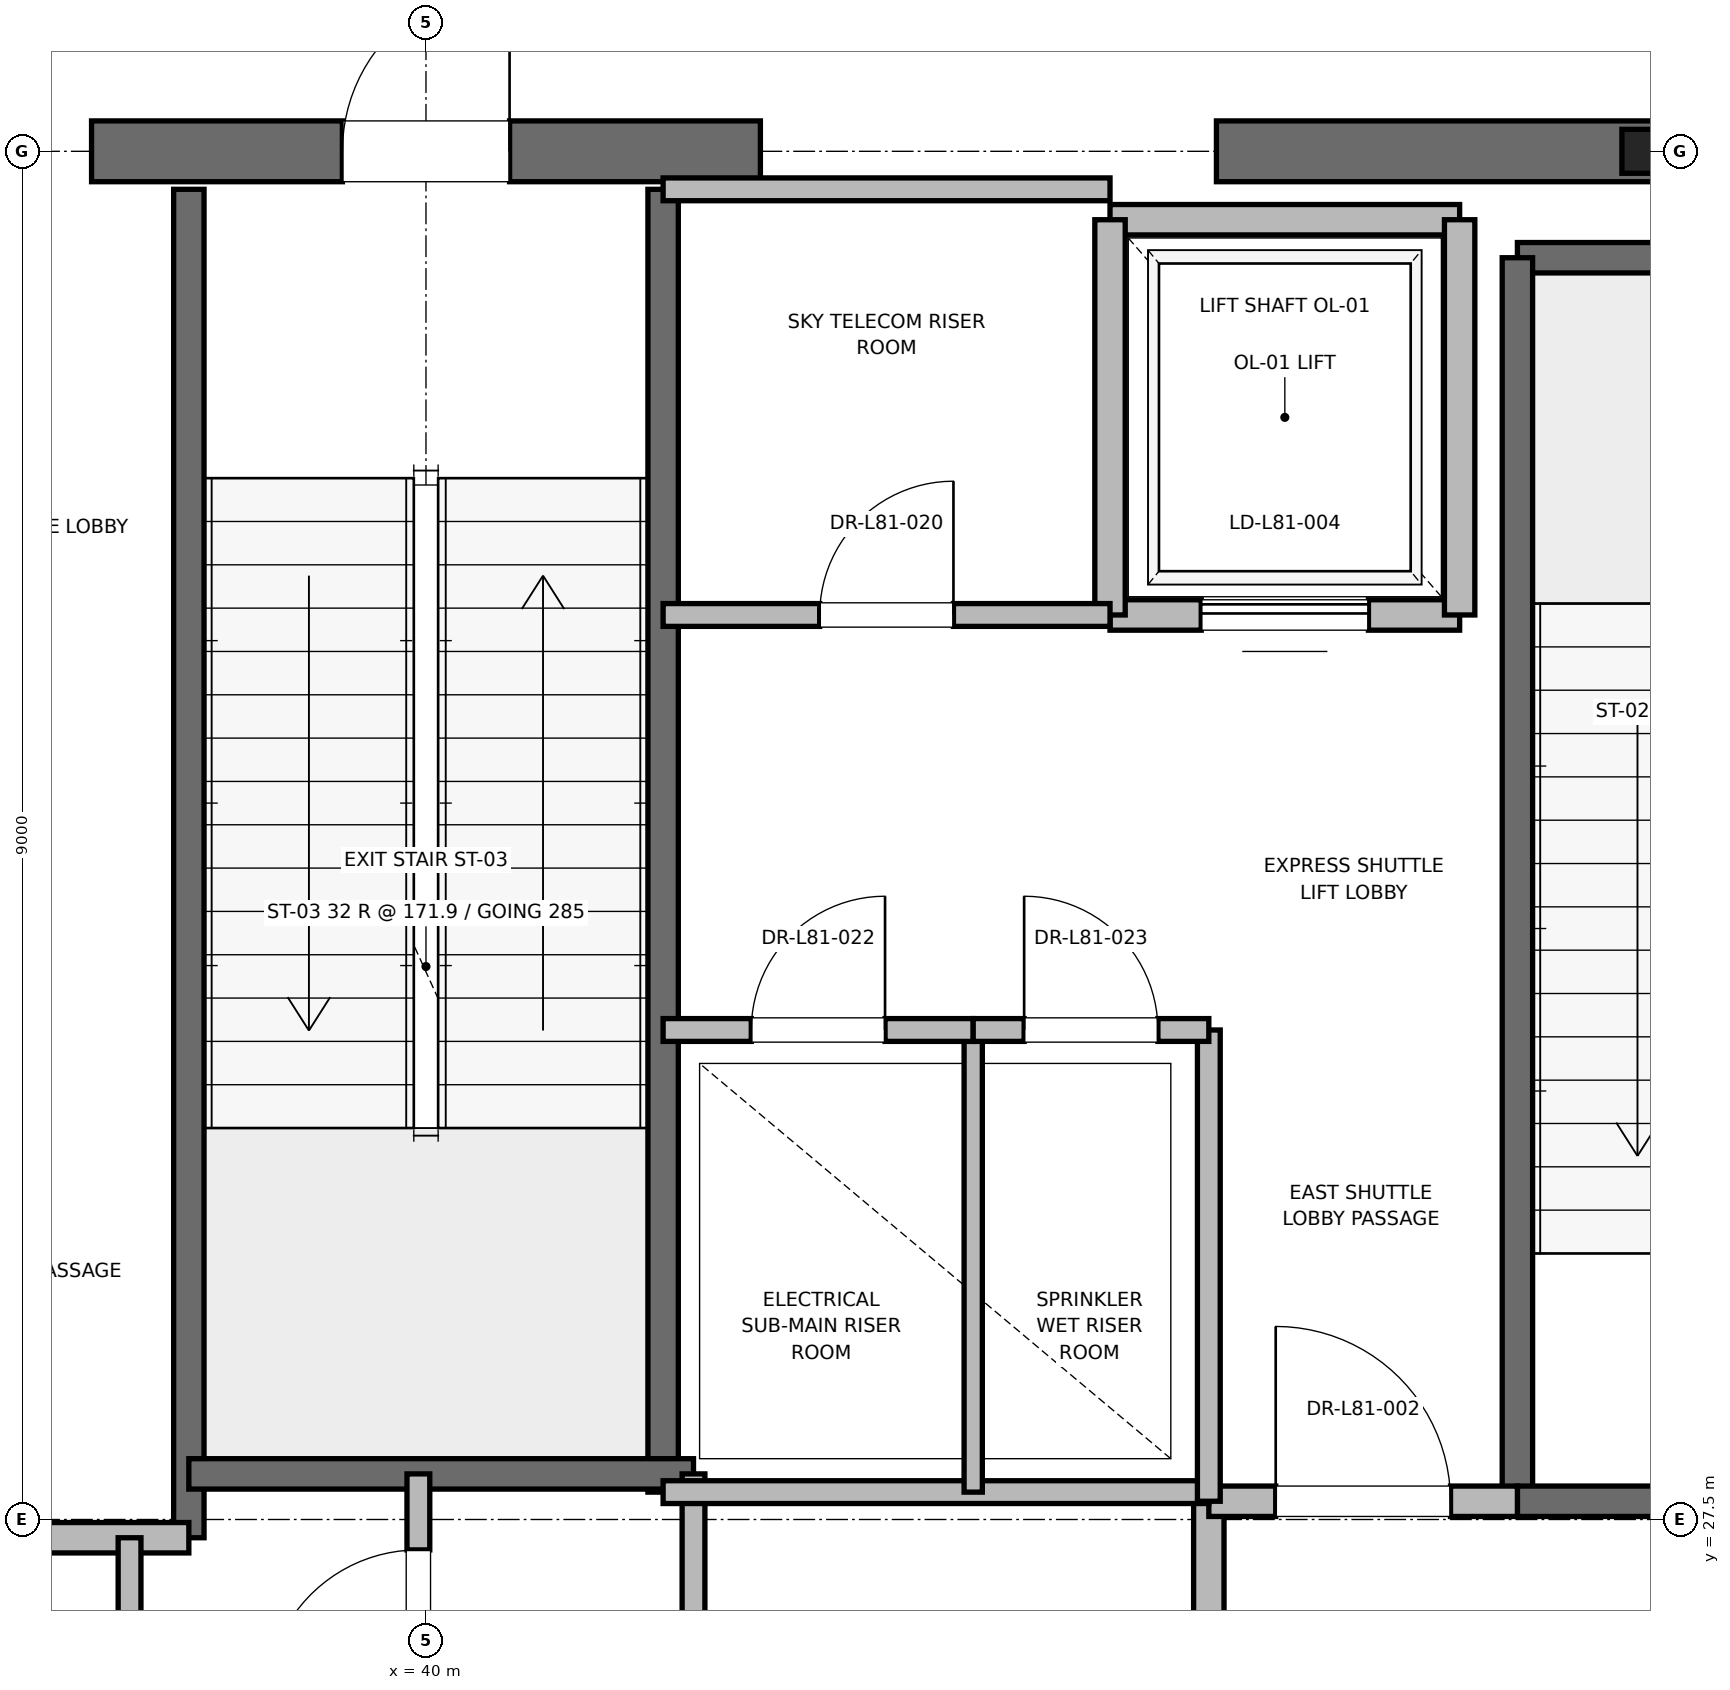
"""IFC4 building model, lengths in metres.
Left out: names, types, materials, properties, quantities, classifications, styles, units other than length and angle.
Written with IfcOpenShell. Run it as: python <this file> out.ifc"""

import sys

from ifc_helpers import new_model, si_unit, direction, frame, frame_2d, origin, origin_2d, place, context, subcontext, project, spatial, rectangle, i_section, extrude, element, fill, save


model = new_model("IFC4")
c1 = context("Model", 3, precision=1e-05, world=origin(), true_north=direction((0.0, 1.0)))
c2 = subcontext(c1, "Body", "Model", "MODEL_VIEW")
j1 = project(units=[si_unit("LENGTHUNIT", "METRE"), si_unit("PLANEANGLEUNIT", "RADIAN")], contexts=[c1])
p1 = place(None, origin())
s1 = spatial("IfcSite", under=j1, at=p1, CompositionType="ELEMENT")
p2 = place(p1, origin())
s2 = spatial("IfcBuilding", under=s1, at=p2, CompositionType="ELEMENT")
p3 = place(p2, frame((0.0, 0.0, 348.8)))
s3 = spatial("IfcBuildingStorey", under=s2, at=p3, CompositionType="ELEMENT", Elevation=348.8)
p4 = place(p3, frame((48.0, 36.5, 0.0), z_axis=(0.0, 0.0, 1.0), x_axis=(1.0, 0.0, 0.0)))
e1 = element("IfcColumn", 1, at=p4, inside=s3, PredefinedType="COLUMN", context=c2, shape_type="SweptSolid", body=[
    extrude(i_section(OverallWidth=0.265, OverallDepth=0.289, WebThickness=0.019, FlangeThickness=0.032, FilletRadius=0.013, at=origin_2d()), origin(), (0.0, 0.0, 1.0), 5.5),
])
p5 = place(p3, frame((37.8, 36.5, 0.0), z_axis=(0.0, 0.0, 1.0), x_axis=(1.0, 0.0, 0.0)))
e2 = element("IfcWall", 2, at=p5, inside=s3, PredefinedType="SHEAR", context=c2, shape_type="SweptSolid", body=[
    extrude(rectangle(XDim=4.4, YDim=0.4, at=frame_2d((2.2, 0.0))), origin(), (0.0, 0.0, 1.0), 5.2),
])
p6 = place(p5, frame((1.65, 0.0, 0.0)))
e3 = element("IfcOpeningElement", 3, at=p6, cuts=e2, PredefinedType="OPENING", context=c2, shape_type="SweptSolid", body=[
    extrude(rectangle(XDim=1.1, YDim=2.15, at=frame_2d((0.55, 1.075))), frame((0.0, 0.2, 0.0), z_axis=(0.0, -1.0, 0.0), x_axis=(1.0, 0.0, 0.0)), (0.0, 0.0, 1.0), 0.4),
])
p7 = place(p3, frame((45.2, 36.5, 0.0), z_axis=(0.0, 0.0, 1.0), x_axis=(1.0, 0.0, 0.0)))
e4 = element("IfcWall", 4, at=p7, inside=s3, PredefinedType="SHEAR", context=c2, shape_type="SweptSolid", body=[
    extrude(rectangle(XDim=5.8, YDim=0.4, at=frame_2d((2.9, 0.0))), origin(), (0.0, 0.0, 1.0), 5.2),
])
p8 = place(p3, frame((47.18, 35.8, 0.0), z_axis=(0.0, 0.0, 1.0), x_axis=(1.0, 0.0, 0.0)))
e5 = element("IfcWall", 5, at=p8, inside=s3, PredefinedType="SOLIDWALL", context=c2, shape_type="SweptSolid", body=[
    extrude(rectangle(XDim=3.12, YDim=0.2, at=frame_2d((1.56, 0.0))), origin(), (0.0, 0.0, 1.0), 5.2),
])
p9 = place(p3, frame((47.18, 27.62, 0.0), z_axis=(0.0, 0.0, 1.0), x_axis=(0.0, 1.0, 0.0)))
e6 = element("IfcWall", 6, at=p9, inside=s3, PredefinedType="SOLIDWALL", context=c2, shape_type="SweptSolid", body=[
    extrude(rectangle(XDim=8.18, YDim=0.2, at=frame_2d((4.09, 0.0))), origin(), (0.0, 0.0, 1.0), 5.2),
])
p10 = place(p3, frame((47.18, 27.62, 0.0), z_axis=(0.0, 0.0, 1.0), x_axis=(1.0, 0.0, 0.0)))
e7 = element("IfcWall", 7, at=p10, inside=s3, PredefinedType="SOLIDWALL", context=c2, shape_type="SweptSolid", body=[
    extrude(rectangle(XDim=3.12, YDim=0.2, at=frame_2d((1.56, 0.0))), origin(), (0.0, 0.0, 1.0), 5.2),
])
p11 = place(p10, frame((1.01, 0.0, 0.0)))
e8 = element("IfcOpeningElement", 8, at=p11, cuts=e7, PredefinedType="OPENING", context=c2, shape_type="SweptSolid", body=[
    extrude(rectangle(XDim=1.1, YDim=2.15, at=frame_2d((0.55, 1.075))), frame((0.0, 0.1, 0.0), z_axis=(0.0, -1.0, 0.0), x_axis=(1.0, 0.0, 0.0)), (0.0, 0.0, 1.0), 0.2),
])
p12 = place(p3, frame((38.44, 27.38, 0.0), z_axis=(0.0, 0.0, 1.0), x_axis=(0.0, 1.0, 0.0)))
e9 = element("IfcWall", 9, at=p12, inside=s3, PredefinedType="SOLIDWALL", context=c2, shape_type="SweptSolid", body=[
    extrude(rectangle(XDim=8.87, YDim=0.2, at=frame_2d((4.435, 0.0))), origin(), (0.0, 0.0, 1.0), 5.2),
])
p13 = place(p3, frame((41.56, 27.68, 0.0), z_axis=(0.0, 0.0, 1.0), x_axis=(0.0, 1.0, 0.0)))
e10 = element("IfcWall", 10, at=p13, inside=s3, PredefinedType="SOLIDWALL", context=c2, shape_type="SweptSolid", body=[
    extrude(rectangle(XDim=8.57, YDim=0.2, at=frame_2d((4.285, 0.0))), origin(), (0.0, 0.0, 1.0), 5.2),
])
p14 = place(p3, frame((38.44, 27.8, 0.0), z_axis=(0.0, 0.0, 1.0), x_axis=(1.0, 0.0, 0.0)))
e11 = element("IfcWall", 11, at=p14, inside=s3, PredefinedType="SOLIDWALL", context=c2, shape_type="SweptSolid", body=[
    extrude(rectangle(XDim=3.32, YDim=0.2, at=frame_2d((1.66, 0.0))), origin(), (0.0, 0.0, 1.0), 5.2),
])
p15 = place(p3, frame((32.82, 27.38, 0.0), z_axis=(0.0, 0.0, 1.0), x_axis=(1.0, 0.0, 0.0)))
e12 = element("IfcWall", 12, at=p15, inside=s3, PredefinedType="PARTITIONING", context=c2, shape_type="SweptSolid", body=[
    extrude(rectangle(XDim=5.62, YDim=0.2, at=frame_2d((2.81, 0.0))), origin(), (0.0, 0.0, 1.0), 5.2),
])
p16 = place(p3, frame((45.15, 24.25, 0.0), z_axis=(0.0, 0.0, 1.0), x_axis=(0.0, 1.0, 0.0)))
e13 = element("IfcWall", 13, at=p16, inside=s3, PredefinedType="PARTITIONING", context=c2, shape_type="SweptSolid", body=[
    extrude(rectangle(XDim=3.37, YDim=0.2, at=frame_2d((1.685, 0.0))), origin(), (0.0, 0.0, 1.0), 5.2),
])
p17 = place(p3, frame((45.15, 27.62, 0.0), z_axis=(0.0, 0.0, 1.0), x_axis=(1.0, 0.0, 0.0)))
e14 = element("IfcWall", 14, at=p17, inside=s3, PredefinedType="PARTITIONING", context=c2, shape_type="SweptSolid", body=[
    extrude(rectangle(XDim=2.03, YDim=0.2, at=frame_2d((1.015, 0.0))), origin(), (0.0, 0.0, 1.0), 5.2),
])
p18 = place(p17, frame((0.44, 0.0, 0.0)))
e15 = element("IfcOpeningElement", 15, at=p18, cuts=e14, PredefinedType="OPENING", context=c2, shape_type="SweptSolid", body=[
    extrude(rectangle(XDim=1.15, YDim=2.2, at=frame_2d((0.575, 1.1))), frame((0.0, 0.1, 0.0), z_axis=(0.0, -1.0, 0.0), x_axis=(1.0, 0.0, 0.0)), (0.0, 0.0, 1.0), 0.2),
])
p19 = place(p3, frame((44.5, 33.45, 0.0), z_axis=(0.0, 0.0, 1.0), x_axis=(1.0, 0.0, 0.0)))
e16 = element("IfcWall", 16, at=p19, inside=s3, PredefinedType="SOLIDWALL", context=c2, shape_type="SweptSolid", body=[
    extrude(rectangle(XDim=2.3, YDim=0.2, at=frame_2d((1.15, 0.0))), origin(), (0.0, 0.0, 1.0), 5.2),
])
p20 = place(p19, frame((0.6, 0.0, 0.0)))
e17 = element("IfcOpeningElement", 17, at=p20, cuts=e16, PredefinedType="OPENING", context=c2, shape_type="SweptSolid", body=[
    extrude(rectangle(XDim=1.1, YDim=2.2, at=frame_2d((0.55, 1.1))), frame((0.0, 0.1, 0.0), z_axis=(0.0, -1.0, 0.0), x_axis=(1.0, 0.0, 0.0)), (0.0, 0.0, 1.0), 0.2),
])
p21 = place(p3, frame((46.8, 36.05, 0.0), z_axis=(0.0, 0.0, 1.0), x_axis=(-1.0, 0.0, 0.0)))
e18 = element("IfcWall", 18, at=p21, inside=s3, PredefinedType="SOLIDWALL", context=c2, shape_type="SweptSolid", body=[
    extrude(rectangle(XDim=2.3, YDim=0.2, at=frame_2d((1.15, 0.0))), origin(), (0.0, 0.0, 1.0), 4.28),
])
p22 = place(p3, frame((44.5, 36.05, 0.0), z_axis=(0.0, 0.0, 1.0), x_axis=(0.0, -1.0, 0.0)))
e19 = element("IfcWall", 19, at=p22, inside=s3, PredefinedType="SOLIDWALL", context=c2, shape_type="SweptSolid", body=[
    extrude(rectangle(XDim=2.6, YDim=0.2, at=frame_2d((1.3, 0.0))), origin(), (0.0, 0.0, 1.0), 4.28),
])
p23 = place(p3, frame((46.8, 33.45, 0.0), z_axis=(0.0, 0.0, 1.0), x_axis=(0.0, 1.0, 0.0)))
e20 = element("IfcWall", 20, at=p23, inside=s3, PredefinedType="SOLIDWALL", context=c2, shape_type="SweptSolid", body=[
    extrude(rectangle(XDim=2.6, YDim=0.2, at=frame_2d((1.3, 0.0))), origin(), (0.0, 0.0, 1.0), 5.2),
])
p24 = place(p3, frame((41.76, 23.8, 0.0), z_axis=(0.0, 0.0, 1.0), x_axis=(0.0, 1.0, 0.0)))
e21 = element("IfcWall", 21, at=p24, inside=s3, PredefinedType="PARTITIONING", context=c2, shape_type="SweptSolid", body=[
    extrude(rectangle(XDim=4.0, YDim=0.15, at=frame_2d((2.0, 0.0))), origin(), (0.0, 0.0, 1.0), 2.85),
])
p25 = place(p3, frame((39.95, 25.8, 0.0), z_axis=(0.0, 0.0, 1.0), x_axis=(0.0, 1.0, 0.0)))
e22 = element("IfcWall", 22, at=p25, inside=s3, PredefinedType="PARTITIONING", context=c2, shape_type="SweptSolid", body=[
    extrude(rectangle(XDim=2.0, YDim=0.15, at=frame_2d((1.0, 0.0))), origin(), (0.0, 0.0, 1.0), 2.85),
])
p26 = place(p25, frame((0.5, 0.0, 0.0)))
e23 = element("IfcOpeningElement", 23, at=p26, cuts=e22, PredefinedType="OPENING", context=c2, shape_type="SweptSolid", body=[
    extrude(rectangle(XDim=1.0, YDim=2.15, at=frame_2d((0.5, 1.075))), frame((0.0, 0.075, 0.0), z_axis=(0.0, -1.0, 0.0), x_axis=(1.0, 0.0, 0.0)), (0.0, 0.0, 1.0), 0.15),
])
p27 = place(p3, frame((38.05, 24.5, 0.0), z_axis=(0.0, 0.0, 1.0), x_axis=(0.0, 1.0, 0.0)))
e24 = element("IfcWall", 24, at=p27, inside=s3, PredefinedType="PARTITIONING", context=c2, shape_type="SweptSolid", body=[
    extrude(rectangle(XDim=2.88, YDim=0.15, at=frame_2d((1.44, 0.0))), origin(), (0.0, 0.0, 1.0), 2.85),
])
p28 = place(p27, frame((0.94, 0.0, 0.0)))
e25 = element("IfcOpeningElement", 25, at=p28, cuts=e24, PredefinedType="OPENING", context=c2, shape_type="SweptSolid", body=[
    extrude(rectangle(XDim=1.0, YDim=2.15, at=frame_2d((0.5, 1.075))), frame((0.0, 0.075, 0.0), z_axis=(0.0, -1.0, 0.0), x_axis=(1.0, 0.0, 0.0)), (0.0, 0.0, 1.0), 0.15),
])
p29 = place(p3, frame((41.56, 27.68, 0.0), z_axis=(0.0, 0.0, 1.0), x_axis=(1.0, 0.0, 0.0)))
e26 = element("IfcWall", 26, at=p29, inside=s3, PredefinedType="PARTITIONING", context=c2, shape_type="SweptSolid", body=[
    extrude(rectangle(XDim=3.59, YDim=0.15, at=frame_2d((1.795, 0.0))), origin(), (0.0, 0.0, 1.0), 2.85),
])
p30 = place(p3, frame((45.15, 27.62, 0.0), z_axis=(0.0, 0.0, 1.0), x_axis=(0.0, 1.0, 0.0)))
e27 = element("IfcWall", 27, at=p30, inside=s3, PredefinedType="PARTITIONING", context=c2, shape_type="SweptSolid", body=[
    extrude(rectangle(XDim=3.1, YDim=0.15, at=frame_2d((1.55, 0.0))), origin(), (0.0, 0.0, 1.0), 2.85),
])
p31 = place(p3, frame((43.6, 27.68, 0.0), z_axis=(0.0, 0.0, 1.0), x_axis=(0.0, 1.0, 0.0)))
e28 = element("IfcWall", 28, at=p31, inside=s3, PredefinedType="PARTITIONING", context=c2, shape_type="SweptSolid", body=[
    extrude(rectangle(XDim=3.04, YDim=0.12, at=frame_2d((1.52, 0.0))), origin(), (0.0, 0.0, 1.0), 2.85),
])
p32 = place(p3, frame((41.56, 30.72, 0.0), z_axis=(0.0, 0.0, 1.0), x_axis=(1.0, 0.0, 0.0)))
e29 = element("IfcWall", 29, at=p32, inside=s3, PredefinedType="PARTITIONING", context=c2, shape_type="SweptSolid", body=[
    extrude(rectangle(XDim=2.04, YDim=0.15, at=frame_2d((1.02, 0.0))), origin(), (0.0, 0.0, 1.0), 2.85),
])
p33 = place(p32, frame((0.58, 0.0, 0.0)))
e30 = element("IfcOpeningElement", 30, at=p33, cuts=e29, PredefinedType="OPENING", context=c2, shape_type="SweptSolid", body=[
    extrude(rectangle(XDim=0.88, YDim=2.1, at=frame_2d((0.44, 1.05))), frame((0.0, 0.075, 0.0), z_axis=(0.0, -1.0, 0.0), x_axis=(1.0, 0.0, 0.0)), (0.0, 0.0, 1.0), 0.15),
])
p34 = place(p3, frame((43.6, 30.72, 0.0), z_axis=(0.0, 0.0, 1.0), x_axis=(1.0, 0.0, 0.0)))
e31 = element("IfcWall", 31, at=p34, inside=s3, PredefinedType="PARTITIONING", context=c2, shape_type="SweptSolid", body=[
    extrude(rectangle(XDim=1.55, YDim=0.15, at=frame_2d((0.775, 0.0))), origin(), (0.0, 0.0, 1.0), 2.85),
])
p35 = place(p34, frame((0.335, 0.0, 0.0)))
e32 = element("IfcOpeningElement", 32, at=p35, cuts=e31, PredefinedType="OPENING", context=c2, shape_type="SweptSolid", body=[
    extrude(rectangle(XDim=0.88, YDim=2.1, at=frame_2d((0.44, 1.05))), frame((0.0, 0.075, 0.0), z_axis=(0.0, -1.0, 0.0), x_axis=(1.0, 0.0, 0.0)), (0.0, 0.0, 1.0), 0.15),
])
p36 = place(p3, frame((41.56, 36.25, 0.0), z_axis=(0.0, 0.0, 1.0), x_axis=(1.0, 0.0, 0.0)))
e33 = element("IfcWall", 33, at=p36, inside=s3, PredefinedType="PARTITIONING", context=c2, shape_type="SweptSolid", body=[
    extrude(rectangle(XDim=2.94, YDim=0.15, at=frame_2d((1.47, 0.0))), origin(), (0.0, 0.0, 1.0), 2.85),
])
p37 = place(p3, frame((41.56, 33.45, 0.0), z_axis=(0.0, 0.0, 1.0), x_axis=(1.0, 0.0, 0.0)))
e34 = element("IfcWall", 34, at=p37, inside=s3, PredefinedType="PARTITIONING", context=c2, shape_type="SweptSolid", body=[
    extrude(rectangle(XDim=2.94, YDim=0.15, at=frame_2d((1.47, 0.0))), origin(), (0.0, 0.0, 1.0), 2.85),
])
p38 = place(p37, frame((1.03, 0.0, 0.0)))
e35 = element("IfcOpeningElement", 35, at=p38, cuts=e34, PredefinedType="OPENING", context=c2, shape_type="SweptSolid", body=[
    extrude(rectangle(XDim=0.88, YDim=2.1, at=frame_2d((0.44, 1.05))), frame((0.0, 0.075, 0.0), z_axis=(0.0, -1.0, 0.0), x_axis=(1.0, 0.0, 0.0)), (0.0, 0.0, 1.0), 0.15),
])
p39 = place(p6, origin())
e36 = element("IfcDoor", 36, at=p39, inside=s3, OperationType="SINGLE_SWING_RIGHT", PredefinedType="DOOR", context=c2, shape_type="SweptSolid", body=[
    extrude(rectangle(XDim=1.1, YDim=2.15, at=frame_2d((0.55, 1.075))), frame((0.0, 0.025, 0.0), z_axis=(0.0, -1.0, 0.0), x_axis=(1.0, 0.0, 0.0)), (0.0, 0.0, 1.0), 0.05),
])
fill(e3, e36)
p40 = place(p18, origin())
e37 = element("IfcDoor", 37, at=p40, inside=s3, OperationType="SINGLE_SWING_LEFT", PredefinedType="DOOR", context=c2, shape_type="SweptSolid", body=[
    extrude(rectangle(XDim=1.15, YDim=2.2, at=frame_2d((0.575, 1.1))), frame((0.0, 0.025, 0.0), z_axis=(0.0, -1.0, 0.0), x_axis=(1.0, 0.0, 0.0)), (0.0, 0.0, 1.0), 0.05),
])
fill(e15, e37)
p41 = place(p20, origin())
e38 = element("IfcDoor", 38, at=p41, inside=s3, OperationType="SLIDING_TO_RIGHT", PredefinedType="DOOR", context=c2, shape_type="SweptSolid", body=[
    extrude(rectangle(XDim=1.1, YDim=2.2, at=frame_2d((0.55, 1.1))), frame((0.0, 0.025, 0.0), z_axis=(0.0, -1.0, 0.0), x_axis=(1.0, 0.0, 0.0)), (0.0, 0.0, 1.0), 0.05),
])
fill(e17, e38)
p42 = place(p26, origin())
e39 = element("IfcDoor", 39, at=p42, inside=s3, OperationType="SINGLE_SWING_LEFT", PredefinedType="DOOR", context=c2, shape_type="SweptSolid", body=[
    extrude(rectangle(XDim=1.0, YDim=2.15, at=frame_2d((0.5, 1.075))), frame((0.0, 0.025, 0.0), z_axis=(0.0, -1.0, 0.0), x_axis=(1.0, 0.0, 0.0)), (0.0, 0.0, 1.0), 0.05),
])
fill(e23, e39)
p43 = place(p33, origin())
e40 = element("IfcDoor", 40, at=p43, inside=s3, OperationType="SINGLE_SWING_RIGHT", PredefinedType="DOOR", context=c2, shape_type="SweptSolid", body=[
    extrude(rectangle(XDim=0.88, YDim=2.1, at=frame_2d((0.44, 1.05))), frame((0.0, 0.025, 0.0), z_axis=(0.0, -1.0, 0.0), x_axis=(1.0, 0.0, 0.0)), (0.0, 0.0, 1.0), 0.05),
])
fill(e30, e40)
p44 = place(p35, origin())
e41 = element("IfcDoor", 41, at=p44, inside=s3, OperationType="SINGLE_SWING_LEFT", PredefinedType="DOOR", context=c2, shape_type="SweptSolid", body=[
    extrude(rectangle(XDim=0.88, YDim=2.1, at=frame_2d((0.44, 1.05))), frame((0.0, 0.025, 0.0), z_axis=(0.0, -1.0, 0.0), x_axis=(1.0, 0.0, 0.0)), (0.0, 0.0, 1.0), 0.05),
])
fill(e32, e41)
p45 = place(p38, origin())
e42 = element("IfcDoor", 42, at=p45, inside=s3, OperationType="SINGLE_SWING_RIGHT", PredefinedType="DOOR", context=c2, shape_type="SweptSolid", body=[
    extrude(rectangle(XDim=0.88, YDim=2.1, at=frame_2d((0.44, 1.05))), frame((0.0, 0.025, 0.0), z_axis=(0.0, -1.0, 0.0), x_axis=(1.0, 0.0, 0.0)), (0.0, 0.0, 1.0), 0.05),
])
fill(e35, e42)
save(model, sys.argv[1])
